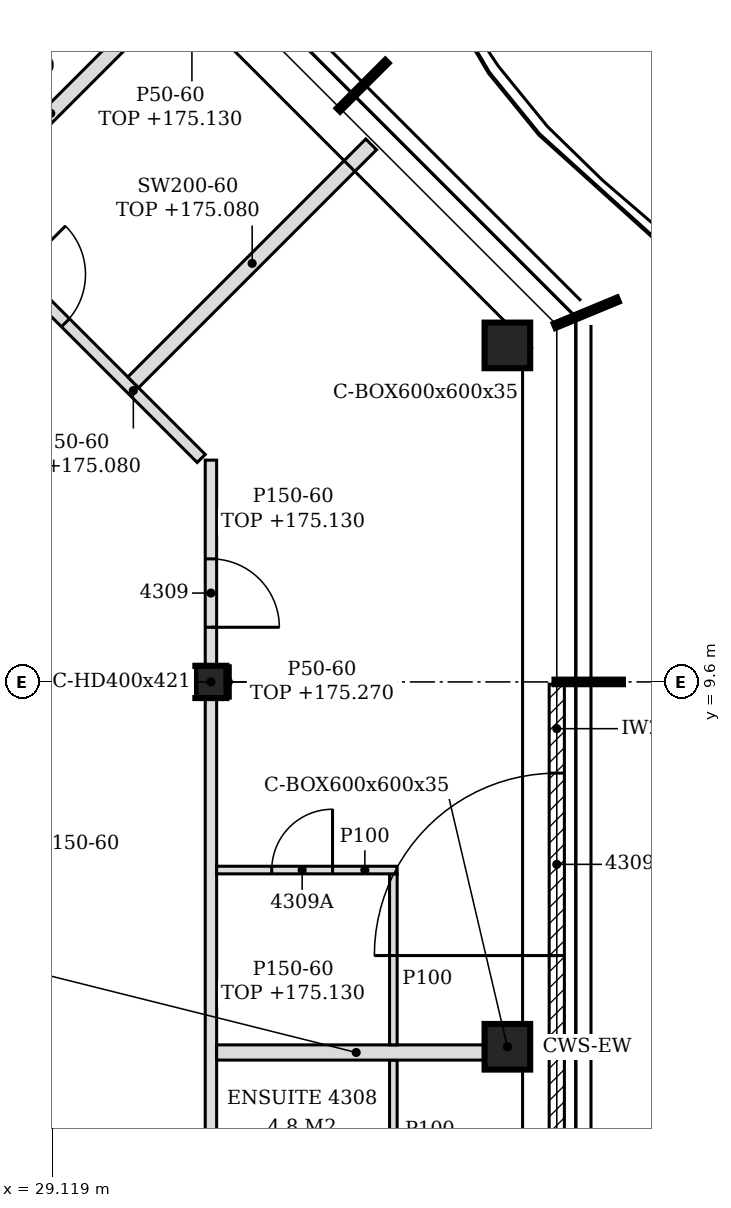
"""IFC4 building model, lengths in metres.
Left out: names, types, materials, properties, quantities, classifications, styles, units other than length and angle.
Written with IfcOpenShell. Run it as: python <this file> out.ifc"""

import sys

from ifc_helpers import new_model, si_unit, direction, frame, frame_2d, origin, origin_2d, place, context, subcontext, project, spatial, polyline, rectangle, hollow_rectangle, i_section, outline, extrude, clip, halfspace, element, fill, save


model = new_model("IFC4")
c1 = context("Model", 3, precision=1e-05, world=origin(), true_north=direction((0.0, 1.0)))
c2 = subcontext(c1, "Body", "Model", "MODEL_VIEW")
j1 = project(units=[si_unit("LENGTHUNIT", "METRE"), si_unit("PLANEANGLEUNIT", "RADIAN")], contexts=[c1])
p1 = place(None, origin())
s1 = spatial("IfcSite", under=j1, at=p1, CompositionType="ELEMENT")
p2 = place(p1, origin())
s2 = spatial("IfcBuilding", under=s1, at=p2, CompositionType="ELEMENT")
p3 = place(p2, frame((0.0, 0.0, 172.2)))
s3 = spatial("IfcBuildingStorey", under=s2, at=p3, CompositionType="ELEMENT", Elevation=172.2)
p4 = place(p3, frame((35.1, 4.8, -0.15), z_axis=(0.062286415717, -0.041591906261, 0.997191313515), x_axis=(0.555325171193, 0.831633305153, 0.0)))
e1 = element("IfcColumn", 1, at=p4, inside=s3, PredefinedType="COLUMN", context=c2, shape_type="Clipping", body=[
    clip(clip(extrude(hollow_rectangle(XDim=0.6, YDim=0.6, WallThickness=0.035, at=origin_2d()), origin(), (0.0, 0.0, 1.0), 3.61), halfspace(frame((0.0, 0.0, 0.011), z_axis=(0.0, 0.0, 1.0), x_axis=(1.0, 0.0, 0.0)), True)), halfspace(frame((0.0, 0.0, 3.588), z_axis=(0.0, 0.0, 1.0), x_axis=(1.0, 0.0, 0.0)), False)),
])
p5 = place(p3, frame((35.1, 14.027, -0.15), z_axis=(0.062286590776, -0.041524393851, 0.99719411617), x_axis=(0.554700196225, 0.832050294338, 0.0)))
e2 = element("IfcColumn", 2, at=p5, inside=s3, PredefinedType="COLUMN", context=c2, shape_type="Clipping", body=[
    clip(clip(extrude(hollow_rectangle(XDim=0.6, YDim=0.6, WallThickness=0.035, at=origin_2d()), origin(), (0.0, 0.0, 1.0), 3.61), halfspace(frame((0.0, 0.0, 0.011), z_axis=(0.0, 0.0, 1.0), x_axis=(1.0, 0.0, 0.0)), True)), halfspace(frame((0.0, 0.0, 3.588), z_axis=(0.0, 0.0, 1.0), x_axis=(1.0, 0.0, 0.0)), False)),
])
p6 = place(p3, frame((31.2, 9.6, -0.15), z_axis=(0.0, 0.0, 1.0), x_axis=(1.0, 0.0, 0.0)))
e3 = element("IfcColumn", 3, at=p6, inside=s3, PredefinedType="COLUMN", context=c2, shape_type="SweptSolid", body=[
    extrude(i_section(OverallWidth=0.409, OverallDepth=0.425, WebThickness=0.033, FlangeThickness=0.052, FilletRadius=0.015, at=origin_2d()), origin(), (0.0, 0.0, 1.0), 3.6),
])
p7 = place(p3, frame((35.75, 0.03, 0.0), z_axis=(0.0, 0.0, 1.0), x_axis=(0.0, 1.0, 0.0)))
e4 = element("IfcWall", 4, at=p7, inside=s3, PredefinedType="NOTDEFINED", context=c2, shape_type="SweptSolid", body=[
    extrude(rectangle(XDim=4.74, YDim=0.2, at=frame_2d((2.37, 0.0))), origin(), (0.0, 0.0, 1.0), 3.45),
])
p8 = place(p7, frame((1.17, 0.0, 0.0)))
e5 = element("IfcOpeningElement", 5, at=p8, cuts=e4, PredefinedType="OPENING", context=c2, shape_type="SweptSolid", body=[
    extrude(rectangle(XDim=2.4, YDim=2.4, at=frame_2d((1.2, 1.2))), frame((0.0, 0.11, 0.0), z_axis=(0.0, -1.0, 0.0), x_axis=(1.0, 0.0, 0.0)), (0.0, 0.0, 1.0), 0.22),
])
p9 = place(p3, frame((35.75, 4.83, 0.0), z_axis=(0.0, 0.0, 1.0), x_axis=(0.0, 1.0, 0.0)))
e6 = element("IfcWall", 6, at=p9, inside=s3, PredefinedType="NOTDEFINED", context=c2, shape_type="SweptSolid", body=[
    extrude(rectangle(XDim=4.74, YDim=0.2, at=frame_2d((2.37, 0.0))), origin(), (0.0, 0.0, 1.0), 3.45),
])
p10 = place(p9, frame((1.17, 0.0, 0.0)))
e7 = element("IfcOpeningElement", 7, at=p10, cuts=e6, PredefinedType="OPENING", context=c2, shape_type="SweptSolid", body=[
    extrude(rectangle(XDim=2.4, YDim=2.4, at=frame_2d((1.2, 1.2))), frame((0.0, 0.11, 0.0), z_axis=(0.0, -1.0, 0.0), x_axis=(1.0, 0.0, 0.0)), (0.0, 0.0, 1.0), 0.22),
])
p11 = place(p3, frame((31.2, 0.387, 0.0), z_axis=(0.0, 0.0, 1.0), x_axis=(0.0, 1.0, 0.0)))
e8 = element("IfcWall", 8, at=p11, inside=s3, PredefinedType="PARTITIONING", context=c2, shape_type="SweptSolid", body=[
    extrude(rectangle(XDim=9.0, YDim=0.15, at=frame_2d((4.5, 0.0))), origin(), (0.0, 0.0, 1.0), 2.93),
])
p12 = place(p11, frame((0.628, 0.0, 0.0)))
e9 = element("IfcOpeningElement", 9, at=p12, cuts=e8, PredefinedType="OPENING", context=c2, shape_type="SweptSolid", body=[
    extrude(rectangle(XDim=0.9, YDim=2.1, at=frame_2d((0.45, 1.05))), frame((0.0, 0.085, 0.0), z_axis=(0.0, -1.0, 0.0), x_axis=(1.0, 0.0, 0.0)), (0.0, 0.0, 1.0), 0.17),
])
p13 = place(p3, frame((33.6, 2.775, 0.0), z_axis=(0.0, 0.0, 1.0), x_axis=(0.0, 1.0, 0.0)))
e10 = element("IfcWall", 10, at=p13, inside=s3, PredefinedType="PARTITIONING", context=c2, shape_type="SweptSolid", body=[
    extrude(outline(polyline([(0.0, 0.0), (1.85, 0.0), (1.85, 3.07), (1.79, 3.07), (1.788, 3.45), (0.0, 3.45), (0.0, 0.0)])), frame((0.0, 0.05, 0.0), z_axis=(0.0, -1.0, 0.0), x_axis=(1.0, 0.0, 0.0)), (0.0, 0.0, 1.0), 0.1),
])
p14 = place(p3, frame((31.275, 4.725, 0.0), z_axis=(0.0, 0.0, 1.0), x_axis=(1.0, 0.0, 0.0)))
e11 = element("IfcWall", 11, at=p14, inside=s3, PredefinedType="PARTITIONING", context=c2, shape_type="SweptSolid", body=[
    extrude(outline(polyline([(0.0, 0.0), (3.418, 0.0), (3.472, 0.863), (3.525, 1.725), (3.594, 2.588), (3.625, 2.93), (0.0, 2.93), (0.0, 2.588), (0.0, 1.725), (0.0, 0.863), (0.0, 0.0)])), frame((0.0, 0.1, 0.0), z_axis=(0.0, -1.0, 0.0), x_axis=(1.0, 0.0, 0.0)), (0.0, 0.0, 1.0), 0.2),
])
p15 = place(p3, frame((33.6, 4.825, 0.0), z_axis=(0.0, 0.0, 1.0), x_axis=(0.0, 1.0, 0.0)))
e12 = element("IfcWall", 12, at=p15, inside=s3, PredefinedType="PARTITIONING", context=c2, shape_type="SweptSolid", body=[
    extrude(rectangle(XDim=2.25, YDim=0.1, at=frame_2d((1.125, 0.0))), origin(), (0.0, 0.0, 1.0), 3.45),
])
p16 = place(p3, frame((31.275, 7.125, 0.0), z_axis=(0.0, 0.0, 1.0), x_axis=(1.0, 0.0, 0.0)))
e13 = element("IfcWall", 13, at=p16, inside=s3, PredefinedType="PARTITIONING", context=c2, shape_type="SweptSolid", body=[
    extrude(outline(polyline([(0.0, 0.0), (2.375, 0.0), (2.375, 3.45), (0.075, 3.45), (0.073, 2.93), (0.0, 2.93), (0.0, 0.0)])), frame((0.0, 0.05, 0.0), z_axis=(0.0, -1.0, 0.0), x_axis=(1.0, 0.0, 0.0)), (0.0, 0.0, 1.0), 0.1),
])
p17 = place(p16, frame((0.725, 0.0, 0.0)))
e14 = element("IfcOpeningElement", 14, at=p17, cuts=e13, PredefinedType="OPENING", context=c2, shape_type="SweptSolid", body=[
    extrude(rectangle(XDim=0.8, YDim=2.1, at=frame_2d((0.4, 1.05))), frame((0.0, 0.06, 0.0), z_axis=(0.0, -1.0, 0.0), x_axis=(1.0, 0.0, 0.0)), (0.0, 0.0, 1.0), 0.12),
])
p18 = place(p3, frame((31.2, 9.812, 0.0), z_axis=(0.0, 0.0, 1.0), x_axis=(0.0, 1.0, 0.0)))
e15 = element("IfcWall", 15, at=p18, inside=s3, PredefinedType="PARTITIONING", context=c2, shape_type="SweptSolid", body=[
    extrude(rectangle(XDim=2.706, YDim=0.15, at=frame_2d((1.353, 0.0))), origin(), (0.0, 0.0, 1.0), 2.93),
])
p19 = place(p18, frame((0.507, 0.0, 0.0)))
e16 = element("IfcOpeningElement", 16, at=p19, cuts=e15, PredefinedType="OPENING", context=c2, shape_type="SweptSolid", body=[
    extrude(rectangle(XDim=0.9, YDim=2.1, at=frame_2d((0.45, 1.05))), frame((0.0, 0.085, 0.0), z_axis=(0.0, -1.0, 0.0), x_axis=(1.0, 0.0, 0.0)), (0.0, 0.0, 1.0), 0.17),
])
p20 = place(p3, frame((31.072, 12.54, 0.0), z_axis=(0.0, 0.0, 1.0), x_axis=(-0.707106781187, 0.707106781187, 0.0)))
e17 = element("IfcWall", 17, at=p20, inside=s3, PredefinedType="PARTITIONING", context=c2, shape_type="SweptSolid", body=[
    extrude(rectangle(XDim=4.61, YDim=0.15, at=frame_2d((2.305, 0.0))), origin(), (0.0, 0.0, 1.0), 2.88),
])
p21 = place(p20, frame((2.525, 0.0, 0.0)))
e18 = element("IfcOpeningElement", 18, at=p21, cuts=e17, PredefinedType="OPENING", context=c2, shape_type="SweptSolid", body=[
    extrude(rectangle(XDim=0.9, YDim=2.1, at=frame_2d((0.45, 1.05))), frame((0.0, 0.085, 0.0), z_axis=(0.0, -1.0, 0.0), x_axis=(1.0, 0.0, 0.0)), (0.0, 0.0, 1.0), 0.17),
])
p22 = place(p3, frame((30.177, 13.541, 0.0), z_axis=(0.0, 0.0, 1.0), x_axis=(0.707106781187, 0.707106781187, 0.0)))
e19 = element("IfcWall", 19, at=p22, inside=s3, PredefinedType="PARTITIONING", context=c2, shape_type="SweptSolid", body=[
    extrude(rectangle(XDim=4.428, YDim=0.2, at=frame_2d((2.214, 0.0))), origin(), (0.0, 0.0, 1.0), 2.88),
])
p23 = place(p3, frame((27.865, 15.853, 0.0), z_axis=(0.0, 0.0, 1.0), x_axis=(0.707106781187, 0.707106781187, 0.0)))
e20 = element("IfcWall", 20, at=p23, inside=s3, PredefinedType="PARTITIONING", context=c2, shape_type="SweptSolid", body=[
    extrude(rectangle(XDim=3.472, YDim=0.2, at=frame_2d((1.736, 0.0))), origin(), (0.0, 0.0, 1.0), 3.45),
])
p24 = place(p3, frame((31.429, 9.387, 0.0), z_axis=(0.0, 0.0, 1.0), x_axis=(0.0, 1.0, 0.0)))
e21 = element("IfcWall", 21, at=p24, inside=s3, PredefinedType="PARTITIONING", context=c2, shape_type="SweptSolid", body=[
    extrude(rectangle(XDim=0.425, YDim=0.05, at=frame_2d((0.212, 0.0))), origin(), (0.0, 0.0, 1.0), 3.07),
])
p25 = place(p10, origin())
e22 = element("IfcDoor", 22, at=p25, inside=s3, OperationType="SINGLE_SWING_LEFT", PredefinedType="DOOR", context=c2, shape_type="SweptSolid", body=[
    extrude(rectangle(XDim=2.4, YDim=2.4, at=frame_2d((1.2, 1.2))), frame((0.0, 0.025, 0.0), z_axis=(0.0, -1.0, 0.0), x_axis=(1.0, 0.0, 0.0)), (0.0, 0.0, 1.0), 0.05),
])
fill(e7, e22)
p26 = place(p19, frame((0.9, 0.0, 0.0), z_axis=(0.0, 0.0, 1.0), x_axis=(-1.0, 0.0, 0.0)))
e23 = element("IfcDoor", 23, at=p26, inside=s3, OperationType="SINGLE_SWING_RIGHT", PredefinedType="DOOR", context=c2, shape_type="SweptSolid", body=[
    extrude(rectangle(XDim=0.9, YDim=2.1, at=frame_2d((0.45, 1.05))), frame((0.0, 0.025, 0.0), z_axis=(0.0, -1.0, 0.0), x_axis=(1.0, 0.0, 0.0)), (0.0, 0.0, 1.0), 0.05),
])
fill(e16, e23)
p27 = place(p17, origin())
e24 = element("IfcDoor", 24, at=p27, inside=s3, OperationType="SINGLE_SWING_RIGHT", PredefinedType="DOOR", context=c2, shape_type="SweptSolid", body=[
    extrude(rectangle(XDim=0.8, YDim=2.1, at=frame_2d((0.4, 1.05))), frame((0.0, 0.025, 0.0), z_axis=(0.0, -1.0, 0.0), x_axis=(1.0, 0.0, 0.0)), (0.0, 0.0, 1.0), 0.05),
])
fill(e14, e24)
p28 = place(p21, frame((0.9, 0.0, 0.0), z_axis=(0.0, 0.0, 1.0), x_axis=(-1.0, 0.0, 0.0)))
e25 = element("IfcDoor", 25, at=p28, inside=s3, OperationType="SINGLE_SWING_LEFT", PredefinedType="DOOR", context=c2, shape_type="SweptSolid", body=[
    extrude(rectangle(XDim=0.9, YDim=2.1, at=frame_2d((0.45, 1.05))), frame((0.0, 0.025, 0.0), z_axis=(0.0, -1.0, 0.0), x_axis=(1.0, 0.0, 0.0)), (0.0, 0.0, 1.0), 0.05),
])
fill(e18, e25)
save(model, sys.argv[1])
